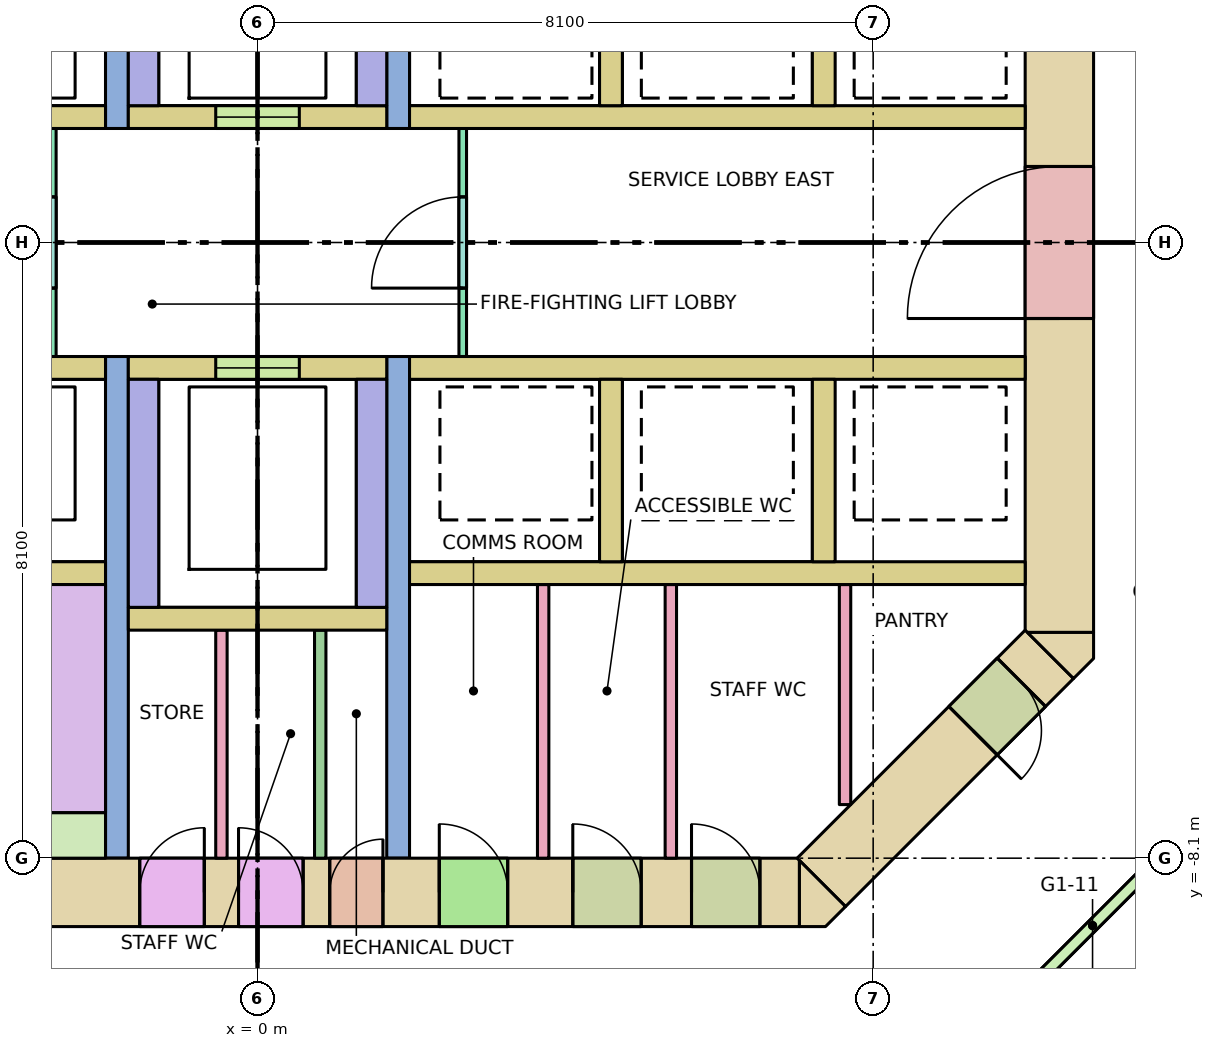
"""IFC4 building model, lengths in metres.
Left out: names, types, materials, properties, quantities, classifications, styles, units other than length and angle.
Written with IfcOpenShell. Run it as: python <this file> out.ifc"""

import sys

from ifc_helpers import new_model, si_unit, direction, frame, frame_2d, origin, place, context, subcontext, project, spatial, polyline, rectangle, outline, extrude, element, fill, save


model = new_model("IFC4")
c1 = context("Model", 3, precision=1e-05, world=origin(), true_north=direction((0.0, 1.0)))
c2 = subcontext(c1, "Body", "Model", "MODEL_VIEW")
j1 = project(units=[si_unit("LENGTHUNIT", "METRE"), si_unit("PLANEANGLEUNIT", "RADIAN")], contexts=[c1])
p1 = place(None, origin())
s1 = spatial("IfcSite", under=j1, at=p1, CompositionType="ELEMENT")
p2 = place(p1, origin())
s2 = spatial("IfcBuilding", under=s1, at=p2, CompositionType="ELEMENT")
p3 = place(p2, frame((0.0, 0.0, 79.0)))
s3 = spatial("IfcBuildingStorey", under=s2, at=p3, CompositionType="ELEMENT", Elevation=79.0)
p4 = place(p3, frame((-7.13, -8.55, -0.28), z_axis=(0.0, 0.0, 1.0), x_axis=(1.0, 0.0, 0.0)))
e1 = element("IfcWall", 1, at=p4, inside=s3, PredefinedType="SHEAR", context=c2, shape_type="SweptSolid", body=[
    extrude(rectangle(XDim=14.26, YDim=0.9, at=frame_2d((7.13, 0.0))), origin(), (0.0, 0.0, 1.0), 7.6),
])
p5 = place(p4, frame((8.08, 0.0, 0.28)))
e2 = element("IfcOpeningElement", 2, at=p5, cuts=e1, PredefinedType="OPENING", context=c2, shape_type="SweptSolid", body=[
    extrude(rectangle(XDim=0.7, YDim=2.1, at=frame_2d((0.35, 1.05))), frame((0.0, 0.46, 0.0), z_axis=(0.0, -1.0, 0.0), x_axis=(1.0, 0.0, 0.0)), (0.0, 0.0, 1.0), 0.92),
])
p6 = place(p4, frame((5.58, 0.0, 0.28)))
e3 = element("IfcOpeningElement", 3, at=p6, cuts=e1, PredefinedType="OPENING", context=c2, shape_type="SweptSolid", body=[
    extrude(rectangle(XDim=0.85, YDim=2.1, at=frame_2d((0.425, 1.05))), frame((0.0, 0.46, 0.0), z_axis=(0.0, -1.0, 0.0), x_axis=(1.0, 0.0, 0.0)), (0.0, 0.0, 1.0), 0.92),
])
p7 = place(p4, frame((6.88, 0.0, 0.28)))
e4 = element("IfcOpeningElement", 4, at=p7, cuts=e1, PredefinedType="OPENING", context=c2, shape_type="SweptSolid", body=[
    extrude(rectangle(XDim=0.85, YDim=2.1, at=frame_2d((0.425, 1.05))), frame((0.0, 0.46, 0.0), z_axis=(0.0, -1.0, 0.0), x_axis=(1.0, 0.0, 0.0)), (0.0, 0.0, 1.0), 0.92),
])
p8 = place(p4, frame((9.521, 0.0, 0.28)))
e5 = element("IfcOpeningElement", 5, at=p8, cuts=e1, PredefinedType="OPENING", context=c2, shape_type="SweptSolid", body=[
    extrude(rectangle(XDim=0.9, YDim=2.1, at=frame_2d((0.45, 1.05))), frame((0.0, 0.46, 0.0), z_axis=(0.0, -1.0, 0.0), x_axis=(1.0, 0.0, 0.0)), (0.0, 0.0, 1.0), 0.92),
])
p9 = place(p4, frame((11.278, 0.0, 0.28)))
e6 = element("IfcOpeningElement", 6, at=p9, cuts=e1, PredefinedType="OPENING", context=c2, shape_type="SweptSolid", body=[
    extrude(rectangle(XDim=0.9, YDim=2.1, at=frame_2d((0.45, 1.05))), frame((0.0, 0.46, 0.0), z_axis=(0.0, -1.0, 0.0), x_axis=(1.0, 0.0, 0.0)), (0.0, 0.0, 1.0), 0.92),
])
p10 = place(p4, frame((12.84, 0.0, 0.28)))
e7 = element("IfcOpeningElement", 7, at=p10, cuts=e1, PredefinedType="OPENING", context=c2, shape_type="SweptSolid", body=[
    extrude(rectangle(XDim=0.9, YDim=2.1, at=frame_2d((0.45, 1.05))), frame((0.0, 0.46, 0.0), z_axis=(0.0, -1.0, 0.0), x_axis=(1.0, 0.0, 0.0)), (0.0, 0.0, 1.0), 0.92),
])
p11 = place(p3, frame((10.55, -5.13, -0.28), z_axis=(0.0, 0.0, 1.0), x_axis=(0.0, 1.0, 0.0)))
e8 = element("IfcWall", 8, at=p11, inside=s3, PredefinedType="SHEAR", context=c2, shape_type="SweptSolid", body=[
    extrude(rectangle(XDim=10.26, YDim=0.9, at=frame_2d((5.13, 0.0))), origin(), (0.0, 0.0, 1.0), 7.6),
])
p12 = place(p11, frame((4.13, 0.0, 0.28)))
e9 = element("IfcOpeningElement", 9, at=p12, cuts=e8, PredefinedType="OPENING", context=c2, shape_type="SweptSolid", body=[
    extrude(rectangle(XDim=2.0, YDim=2.1, at=frame_2d((1.0, 1.05))), frame((0.0, 0.46, 0.0), z_axis=(0.0, -1.0, 0.0), x_axis=(1.0, 0.0, 0.0)), (0.0, 0.0, 1.0), 0.92),
])
p13 = place(p3, frame((10.418, -5.418, -0.28), z_axis=(0.0, 0.0, 1.0), x_axis=(-0.707106781187, -0.707106781187, 0.0)))
e10 = element("IfcWall", 10, at=p13, inside=s3, PredefinedType="SHEAR", context=c2, shape_type="SweptSolid", body=[
    extrude(rectangle(XDim=4.243, YDim=0.9, at=frame_2d((2.121, 0.0))), origin(), (0.0, 0.0, 1.0), 7.6),
])
p14 = place(p13, frame((0.52, 0.0, 0.28)))
e11 = element("IfcOpeningElement", 11, at=p14, cuts=e10, PredefinedType="OPENING", context=c2, shape_type="SweptSolid", body=[
    extrude(rectangle(XDim=0.9, YDim=2.1, at=frame_2d((0.45, 1.05))), frame((0.0, 0.46, 0.0), z_axis=(0.0, -1.0, 0.0), x_axis=(1.0, 0.0, 0.0)), (0.0, 0.0, 1.0), 0.92),
])
p15 = place(p3, frame((0.0, 0.0, -0.28)))
e12 = element("IfcWall", 12, at=p15, inside=s3, PredefinedType="SHEAR", context=c2, shape_type="SweptSolid", body=[
    extrude(outline(polyline([(7.473, -9.0), (7.13, -9.0), (7.13, -8.13), (7.736, -8.736), (7.473, -9.0)])), origin(), (0.0, 0.0, 1.0), 7.6),
])
p16 = place(p3, frame((0.0, 0.0, -0.28)))
e13 = element("IfcWall", 13, at=p16, inside=s3, PredefinedType="SHEAR", context=c2, shape_type="SweptSolid", body=[
    extrude(outline(polyline([(11.0, -5.473), (10.736, -5.736), (10.13, -5.13), (11.0, -5.13), (11.0, -5.473)])), origin(), (0.0, 0.0, 1.0), 7.6),
])
for number, where, z_axis, x_axis in (
    (14, (-10.1, -4.35, 0.0), (0.0, 0.0, 1.0), (1.0, 0.0, 0.0)),
    (15, (2.0, -4.35, 0.0), (0.0, 0.0, 1.0), (1.0, 0.0, 0.0)),
):
    element("IfcWall", number, at=place(p3, frame(where, z_axis=z_axis, x_axis=x_axis)), inside=s3, PredefinedType="SOLIDWALL", context=c2, shape_type="SweptSolid", body=[
        extrude(rectangle(XDim=8.1, YDim=0.3, at=frame_2d((4.05, 0.0))), origin(), (0.0, 0.0, 1.0), 7.32),
    ])
p17 = place(p3, frame((-10.1, 1.65, 0.0), z_axis=(0.0, 0.0, 1.0), x_axis=(1.0, 0.0, 0.0)))
e16 = element("IfcWall", 16, at=p17, inside=s3, PredefinedType="SOLIDWALL", context=c2, shape_type="SweptSolid", body=[
    extrude(rectangle(XDim=8.1, YDim=0.3, at=frame_2d((4.05, 0.0))), origin(), (0.0, 0.0, 1.0), 7.32),
])
p18 = place(p17, frame((0.7, 0.0, 0.0)))
e17 = element("IfcOpeningElement", 17, at=p18, cuts=e16, PredefinedType="OPENING", context=c2, shape_type="SweptSolid", body=[
    extrude(rectangle(XDim=1.1, YDim=2.1, at=frame_2d((0.55, 1.05))), frame((0.0, 0.16, 0.0), z_axis=(0.0, -1.0, 0.0), x_axis=(1.0, 0.0, 0.0)), (0.0, 0.0, 1.0), 0.32),
])
p19 = place(p17, frame((3.5, 0.0, 0.0)))
e18 = element("IfcOpeningElement", 18, at=p19, cuts=e16, PredefinedType="OPENING", context=c2, shape_type="SweptSolid", body=[
    extrude(rectangle(XDim=1.1, YDim=2.1, at=frame_2d((0.55, 1.05))), frame((0.0, 0.16, 0.0), z_axis=(0.0, -1.0, 0.0), x_axis=(1.0, 0.0, 0.0)), (0.0, 0.0, 1.0), 0.32),
])
p20 = place(p17, frame((6.15, 0.0, 0.0)))
e19 = element("IfcOpeningElement", 19, at=p20, cuts=e16, PredefinedType="OPENING", context=c2, shape_type="SweptSolid", body=[
    extrude(rectangle(XDim=1.1, YDim=2.1, at=frame_2d((0.55, 1.05))), frame((0.0, 0.16, 0.0), z_axis=(0.0, -1.0, 0.0), x_axis=(1.0, 0.0, 0.0)), (0.0, 0.0, 1.0), 0.32),
])
p21 = place(p3, frame((-10.1, -1.65, 0.0), z_axis=(0.0, 0.0, 1.0), x_axis=(1.0, 0.0, 0.0)))
e20 = element("IfcWall", 20, at=p21, inside=s3, PredefinedType="SOLIDWALL", context=c2, shape_type="SweptSolid", body=[
    extrude(rectangle(XDim=8.1, YDim=0.3, at=frame_2d((4.05, 0.0))), origin(), (0.0, 0.0, 1.0), 7.32),
])
p22 = place(p21, frame((0.7, 0.0, 0.0)))
e21 = element("IfcOpeningElement", 21, at=p22, cuts=e20, PredefinedType="OPENING", context=c2, shape_type="SweptSolid", body=[
    extrude(rectangle(XDim=1.1, YDim=2.1, at=frame_2d((0.55, 1.05))), frame((0.0, 0.16, 0.0), z_axis=(0.0, -1.0, 0.0), x_axis=(1.0, 0.0, 0.0)), (0.0, 0.0, 1.0), 0.32),
])
p23 = place(p21, frame((3.5, 0.0, 0.0)))
e22 = element("IfcOpeningElement", 22, at=p23, cuts=e20, PredefinedType="OPENING", context=c2, shape_type="SweptSolid", body=[
    extrude(rectangle(XDim=1.1, YDim=2.1, at=frame_2d((0.55, 1.05))), frame((0.0, 0.16, 0.0), z_axis=(0.0, -1.0, 0.0), x_axis=(1.0, 0.0, 0.0)), (0.0, 0.0, 1.0), 0.32),
])
p24 = place(p21, frame((6.15, 0.0, 0.0)))
e23 = element("IfcOpeningElement", 23, at=p24, cuts=e20, PredefinedType="OPENING", context=c2, shape_type="SweptSolid", body=[
    extrude(rectangle(XDim=1.1, YDim=2.1, at=frame_2d((0.55, 1.05))), frame((0.0, 0.16, 0.0), z_axis=(0.0, -1.0, 0.0), x_axis=(1.0, 0.0, 0.0)), (0.0, 0.0, 1.0), 0.32),
])
for number, where, z_axis, x_axis in (
    (24, (2.0, 1.65, 0.0), (0.0, 0.0, 1.0), (1.0, 0.0, 0.0)),
    (25, (2.0, -1.65, 0.0), (0.0, 0.0, 1.0), (1.0, 0.0, 0.0)),
):
    element("IfcWall", number, at=place(p3, frame(where, z_axis=z_axis, x_axis=x_axis)), inside=s3, PredefinedType="SOLIDWALL", context=c2, shape_type="SweptSolid", body=[
        extrude(rectangle(XDim=8.1, YDim=0.3, at=frame_2d((4.05, 0.0))), origin(), (0.0, 0.0, 1.0), 7.32),
    ])
for number, where, z_axis, x_axis in (
    (26, (4.65, 1.8, 0.0), (0.0, 0.0, 1.0), (0.0, 1.0, 0.0)),
    (27, (4.65, -4.2, 0.0), (0.0, 0.0, 1.0), (0.0, 1.0, 0.0)),
    (28, (7.45, 1.8, 0.0), (0.0, 0.0, 1.0), (0.0, 1.0, 0.0)),
    (29, (7.45, -4.2, 0.0), (0.0, 0.0, 1.0), (0.0, 1.0, 0.0)),
):
    element("IfcWall", number, at=place(p3, frame(where, z_axis=z_axis, x_axis=x_axis)), inside=s3, PredefinedType="SOLIDWALL", context=c2, shape_type="SweptSolid", body=[
        extrude(rectangle(XDim=2.4, YDim=0.3, at=frame_2d((1.2, 0.0))), origin(), (0.0, 0.0, 1.0), 7.32),
    ])
for number, where, z_axis, x_axis in (
    (30, (-1.85, 1.5, 0.0), (0.0, 0.0, 1.0), (0.0, 1.0, 0.0)),
    (31, (-1.85, -8.1, 0.0), (0.0, 0.0, 1.0), (0.0, 1.0, 0.0)),
    (32, (1.85, 1.5, 0.0), (0.0, 0.0, 1.0), (0.0, 1.0, 0.0)),
    (33, (1.85, -8.1, 0.0), (0.0, 0.0, 1.0), (0.0, 1.0, 0.0)),
):
    element("IfcWall", number, at=place(p3, frame(where, z_axis=z_axis, x_axis=x_axis)), inside=s3, PredefinedType="SHEAR", context=c2, shape_type="SweptSolid", body=[
        extrude(rectangle(XDim=6.6, YDim=0.3, at=frame_2d((3.3, 0.0))), origin(), (0.0, 0.0, 1.0), 7.32),
    ])
p25 = place(p3, frame((-1.7, 1.65, 0.0), z_axis=(0.0, 0.0, 1.0), x_axis=(1.0, 0.0, 0.0)))
e34 = element("IfcWall", 34, at=p25, inside=s3, PredefinedType="SOLIDWALL", context=c2, shape_type="SweptSolid", body=[
    extrude(rectangle(XDim=3.4, YDim=0.3, at=frame_2d((1.7, 0.0))), origin(), (0.0, 0.0, 1.0), 7.32),
])
p26 = place(p25, frame((1.15, 0.0, 0.0)))
e35 = element("IfcOpeningElement", 35, at=p26, cuts=e34, PredefinedType="OPENING", context=c2, shape_type="SweptSolid", body=[
    extrude(rectangle(XDim=1.1, YDim=2.1, at=frame_2d((0.55, 1.05))), frame((0.0, 0.16, 0.0), z_axis=(0.0, -1.0, 0.0), x_axis=(1.0, 0.0, 0.0)), (0.0, 0.0, 1.0), 0.32),
])
p27 = place(p3, frame((-1.7, -1.65, 0.0), z_axis=(0.0, 0.0, 1.0), x_axis=(1.0, 0.0, 0.0)))
e36 = element("IfcWall", 36, at=p27, inside=s3, PredefinedType="SOLIDWALL", context=c2, shape_type="SweptSolid", body=[
    extrude(rectangle(XDim=3.4, YDim=0.3, at=frame_2d((1.7, 0.0))), origin(), (0.0, 0.0, 1.0), 7.32),
])
p28 = place(p27, frame((1.15, 0.0, 0.0)))
e37 = element("IfcOpeningElement", 37, at=p28, cuts=e36, PredefinedType="OPENING", context=c2, shape_type="SweptSolid", body=[
    extrude(rectangle(XDim=1.1, YDim=2.1, at=frame_2d((0.55, 1.05))), frame((0.0, 0.16, 0.0), z_axis=(0.0, -1.0, 0.0), x_axis=(1.0, 0.0, 0.0)), (0.0, 0.0, 1.0), 0.32),
])
for number, where, z_axis, x_axis in (
    (38, (-1.5, 1.8, 0.0), (0.0, 0.0, 1.0), (0.0, 1.0, 0.0)),
    (39, (-1.5, -4.8, 0.0), (0.0, 0.0, 1.0), (0.0, 1.0, 0.0)),
    (40, (1.5, 1.8, 0.0), (0.0, 0.0, 1.0), (0.0, 1.0, 0.0)),
    (41, (1.5, -4.8, 0.0), (0.0, 0.0, 1.0), (0.0, 1.0, 0.0)),
):
    element("IfcWall", number, at=place(p3, frame(where, z_axis=z_axis, x_axis=x_axis)), inside=s3, PredefinedType="SOLIDWALL", context=c2, shape_type="SweptSolid", body=[
        extrude(rectangle(XDim=3.0, YDim=0.4, at=frame_2d((1.5, 0.0))), origin(), (0.0, 0.0, 1.0), 7.32),
    ])
p29 = place(p3, frame((-1.7, -4.95, 0.0), z_axis=(0.0, 0.0, 1.0), x_axis=(1.0, 0.0, 0.0)))
e42 = element("IfcWall", 42, at=p29, inside=s3, PredefinedType="SOLIDWALL", context=c2, shape_type="SweptSolid", body=[
    extrude(rectangle(XDim=3.4, YDim=0.3, at=frame_2d((1.7, 0.0))), origin(), (0.0, 0.0, 1.0), 7.32),
])
p30 = place(p3, frame((-7.37, -7.8, 0.0), z_axis=(0.0, 0.0, 1.0), x_axis=(1.0, 0.0, 0.0)))
e43 = element("IfcWall", 43, at=p30, inside=s3, PredefinedType="SHEAR", context=c2, shape_type="SweptSolid", body=[
    extrude(rectangle(XDim=5.37, YDim=0.6, at=frame_2d((2.685, 0.0))), origin(), (0.0, 0.0, 1.0), 7.32),
])
p31 = place(p3, frame((-2.7, -1.5, 0.0), z_axis=(0.0, 0.0, 1.0), x_axis=(0.0, 1.0, 0.0)))
e44 = element("IfcWall", 44, at=p31, inside=s3, PredefinedType="PARTITIONING", context=c2, shape_type="SweptSolid", body=[
    extrude(rectangle(XDim=3.0, YDim=0.1, at=frame_2d((1.5, 0.0))), origin(), (0.0, 0.0, 1.0), 7.32),
])
p32 = place(p31, frame((0.9, 0.0, 0.0)))
e45 = element("IfcOpeningElement", 45, at=p32, cuts=e44, PredefinedType="OPENING", context=c2, shape_type="SweptSolid", body=[
    extrude(rectangle(XDim=1.2, YDim=2.1, at=frame_2d((0.6, 1.05))), frame((0.0, 0.06, 0.0), z_axis=(0.0, -1.0, 0.0), x_axis=(1.0, 0.0, 0.0)), (0.0, 0.0, 1.0), 0.12),
])
p33 = place(p3, frame((2.7, -1.5, 0.0), z_axis=(0.0, 0.0, 1.0), x_axis=(0.0, 1.0, 0.0)))
e46 = element("IfcWall", 46, at=p33, inside=s3, PredefinedType="PARTITIONING", context=c2, shape_type="SweptSolid", body=[
    extrude(rectangle(XDim=3.0, YDim=0.1, at=frame_2d((1.5, 0.0))), origin(), (0.0, 0.0, 1.0), 7.32),
])
p34 = place(p33, frame((0.9, 0.0, 0.0)))
e47 = element("IfcOpeningElement", 47, at=p34, cuts=e46, PredefinedType="OPENING", context=c2, shape_type="SweptSolid", body=[
    extrude(rectangle(XDim=1.2, YDim=2.1, at=frame_2d((0.6, 1.05))), frame((0.0, 0.06, 0.0), z_axis=(0.0, -1.0, 0.0), x_axis=(1.0, 0.0, 0.0)), (0.0, 0.0, 1.0), 0.12),
])
for number, where, z_axis, x_axis in (
    (48, (0.825, -8.1, 0.0), (0.0, 0.0, 1.0), (0.0, 1.0, 0.0)),
    (49, (-0.475, -8.1, 0.0), (0.0, 0.0, 1.0), (0.0, 1.0, 0.0)),
):
    element("IfcWall", number, at=place(p3, frame(where, z_axis=z_axis, x_axis=x_axis)), inside=s3, PredefinedType="PARTITIONING", context=c2, shape_type="SweptSolid", body=[
        extrude(rectangle(XDim=3.0, YDim=0.15, at=frame_2d((1.5, 0.0))), origin(), (0.0, 0.0, 1.0), 7.32),
    ])
for number, where, z_axis, x_axis in (
    (50, (3.758, -8.1, 0.0), (0.0, 0.0, 1.0), (0.0, 1.0, 0.0)),
    (51, (5.438, -8.1, 0.0), (0.0, 0.0, 1.0), (0.0, 1.0, 0.0)),
):
    element("IfcWall", number, at=place(p3, frame(where, z_axis=z_axis, x_axis=x_axis)), inside=s3, PredefinedType="PARTITIONING", context=c2, shape_type="SweptSolid", body=[
        extrude(rectangle(XDim=3.6, YDim=0.15, at=frame_2d((1.8, 0.0))), origin(), (0.0, 0.0, 1.0), 7.32),
    ])
p35 = place(p3, frame((7.73, -7.395, 0.0), z_axis=(0.0, 0.0, 1.0), x_axis=(0.0, 1.0, 0.0)))
e52 = element("IfcWall", 52, at=p35, inside=s3, PredefinedType="PARTITIONING", context=c2, shape_type="SweptSolid", body=[
    extrude(rectangle(XDim=2.895, YDim=0.15, at=frame_2d((1.448, 0.0))), origin(), (0.0, 0.0, 1.0), 7.32),
])
p36 = place(p3, frame((13.438, -6.535, 0.0), z_axis=(0.0, 0.0, 1.0), x_axis=(-0.707106781187, -0.707106781187, 0.0)))
e53 = element("IfcWall", 53, at=p36, inside=s3, PredefinedType="PARTITIONING", context=c2, shape_type="SweptSolid", body=[
    extrude(rectangle(XDim=6.934, YDim=0.15, at=frame_2d((3.467, 0.0))), origin(), (0.0, 0.0, 1.0), 6.42),
])
p37 = place(p36, frame((2.567, 0.0, 0.0)))
e54 = element("IfcOpeningElement", 54, at=p37, cuts=e53, PredefinedType="OPENING", context=c2, shape_type="SweptSolid", body=[
    extrude(rectangle(XDim=1.8, YDim=2.1, at=frame_2d((0.9, 1.05))), frame((0.0, 0.085, 0.0), z_axis=(0.0, -1.0, 0.0), x_axis=(1.0, 0.0, 0.0)), (0.0, 0.0, 1.0), 0.17),
])
p38 = place(p26, origin())
e55 = element("IfcDoor", 55, at=p38, inside=s3, OperationType="DOUBLE_DOOR_SLIDING", PredefinedType="DOOR", context=c2, shape_type="SweptSolid", body=[
    extrude(rectangle(XDim=1.1, YDim=2.1, at=frame_2d((0.55, 1.05))), frame((0.0, 0.025, 0.0), z_axis=(0.0, -1.0, 0.0), x_axis=(1.0, 0.0, 0.0)), (0.0, 0.0, 1.0), 0.05),
])
fill(e35, e55)
p39 = place(p28, origin())
e56 = element("IfcDoor", 56, at=p39, inside=s3, OperationType="DOUBLE_DOOR_SLIDING", PredefinedType="DOOR", context=c2, shape_type="SweptSolid", body=[
    extrude(rectangle(XDim=1.1, YDim=2.1, at=frame_2d((0.55, 1.05))), frame((0.0, 0.025, 0.0), z_axis=(0.0, -1.0, 0.0), x_axis=(1.0, 0.0, 0.0)), (0.0, 0.0, 1.0), 0.05),
])
fill(e37, e56)
p40 = place(p12, origin())
e57 = element("IfcDoor", 57, at=p40, inside=s3, OperationType="DOUBLE_DOOR_SINGLE_SWING", PredefinedType="DOOR", context=c2, shape_type="SweptSolid", body=[
    extrude(rectangle(XDim=2.0, YDim=2.1, at=frame_2d((1.0, 1.05))), frame((0.0, 0.025, 0.0), z_axis=(0.0, -1.0, 0.0), x_axis=(1.0, 0.0, 0.0)), (0.0, 0.0, 1.0), 0.05),
])
fill(e9, e57)
p41 = place(p32, origin())
e58 = element("IfcDoor", 58, at=p41, inside=s3, OperationType="SINGLE_SWING_LEFT", PredefinedType="DOOR", context=c2, shape_type="SweptSolid", body=[
    extrude(rectangle(XDim=1.2, YDim=2.1, at=frame_2d((0.6, 1.05))), frame((0.0, 0.025, 0.0), z_axis=(0.0, -1.0, 0.0), x_axis=(1.0, 0.0, 0.0)), (0.0, 0.0, 1.0), 0.05),
])
fill(e45, e58)
p42 = place(p34, origin())
e59 = element("IfcDoor", 59, at=p42, inside=s3, OperationType="SINGLE_SWING_LEFT", PredefinedType="DOOR", context=c2, shape_type="SweptSolid", body=[
    extrude(rectangle(XDim=1.2, YDim=2.1, at=frame_2d((0.6, 1.05))), frame((0.0, 0.025, 0.0), z_axis=(0.0, -1.0, 0.0), x_axis=(1.0, 0.0, 0.0)), (0.0, 0.0, 1.0), 0.05),
])
fill(e47, e59)
p43 = place(p5, origin())
e60 = element("IfcDoor", 60, at=p43, inside=s3, OperationType="SINGLE_SWING_RIGHT", PredefinedType="DOOR", context=c2, shape_type="SweptSolid", body=[
    extrude(rectangle(XDim=0.7, YDim=2.1, at=frame_2d((0.35, 1.05))), frame((0.0, 0.025, 0.0), z_axis=(0.0, -1.0, 0.0), x_axis=(1.0, 0.0, 0.0)), (0.0, 0.0, 1.0), 0.05),
])
fill(e2, e60)
p44 = place(p6, origin())
e61 = element("IfcDoor", 61, at=p44, inside=s3, OperationType="SINGLE_SWING_RIGHT", PredefinedType="DOOR", context=c2, shape_type="SweptSolid", body=[
    extrude(rectangle(XDim=0.85, YDim=2.1, at=frame_2d((0.425, 1.05))), frame((0.0, 0.025, 0.0), z_axis=(0.0, -1.0, 0.0), x_axis=(1.0, 0.0, 0.0)), (0.0, 0.0, 1.0), 0.05),
])
fill(e3, e61)
p45 = place(p7, origin())
e62 = element("IfcDoor", 62, at=p45, inside=s3, OperationType="SINGLE_SWING_LEFT", PredefinedType="DOOR", context=c2, shape_type="SweptSolid", body=[
    extrude(rectangle(XDim=0.85, YDim=2.1, at=frame_2d((0.425, 1.05))), frame((0.0, 0.025, 0.0), z_axis=(0.0, -1.0, 0.0), x_axis=(1.0, 0.0, 0.0)), (0.0, 0.0, 1.0), 0.05),
])
fill(e4, e62)
p46 = place(p8, origin())
e63 = element("IfcDoor", 63, at=p46, inside=s3, OperationType="SINGLE_SWING_LEFT", PredefinedType="DOOR", context=c2, shape_type="SweptSolid", body=[
    extrude(rectangle(XDim=0.9, YDim=2.1, at=frame_2d((0.45, 1.05))), frame((0.0, 0.025, 0.0), z_axis=(0.0, -1.0, 0.0), x_axis=(1.0, 0.0, 0.0)), (0.0, 0.0, 1.0), 0.05),
])
fill(e5, e63)
p47 = place(p9, origin())
e64 = element("IfcDoor", 64, at=p47, inside=s3, OperationType="SINGLE_SWING_LEFT", PredefinedType="DOOR", context=c2, shape_type="SweptSolid", body=[
    extrude(rectangle(XDim=0.9, YDim=2.1, at=frame_2d((0.45, 1.05))), frame((0.0, 0.025, 0.0), z_axis=(0.0, -1.0, 0.0), x_axis=(1.0, 0.0, 0.0)), (0.0, 0.0, 1.0), 0.05),
])
fill(e6, e64)
p48 = place(p10, origin())
e65 = element("IfcDoor", 65, at=p48, inside=s3, OperationType="SINGLE_SWING_LEFT", PredefinedType="DOOR", context=c2, shape_type="SweptSolid", body=[
    extrude(rectangle(XDim=0.9, YDim=2.1, at=frame_2d((0.45, 1.05))), frame((0.0, 0.025, 0.0), z_axis=(0.0, -1.0, 0.0), x_axis=(1.0, 0.0, 0.0)), (0.0, 0.0, 1.0), 0.05),
])
fill(e7, e65)
p49 = place(p14, origin())
e66 = element("IfcDoor", 66, at=p49, inside=s3, OperationType="SINGLE_SWING_RIGHT", PredefinedType="DOOR", context=c2, shape_type="SweptSolid", body=[
    extrude(rectangle(XDim=0.9, YDim=2.1, at=frame_2d((0.45, 1.05))), frame((0.0, 0.025, 0.0), z_axis=(0.0, -1.0, 0.0), x_axis=(1.0, 0.0, 0.0)), (0.0, 0.0, 1.0), 0.05),
])
fill(e11, e66)
p50 = place(p37, origin())
e67 = element("IfcDoor", 67, at=p50, inside=s3, OperationType="DOUBLE_DOOR_SINGLE_SWING", PredefinedType="DOOR", context=c2, shape_type="SweptSolid", body=[
    extrude(rectangle(XDim=1.8, YDim=2.1, at=frame_2d((0.9, 1.05))), frame((0.0, 0.025, 0.0), z_axis=(0.0, -1.0, 0.0), x_axis=(1.0, 0.0, 0.0)), (0.0, 0.0, 1.0), 0.05),
])
fill(e54, e67)
save(model, sys.argv[1])
